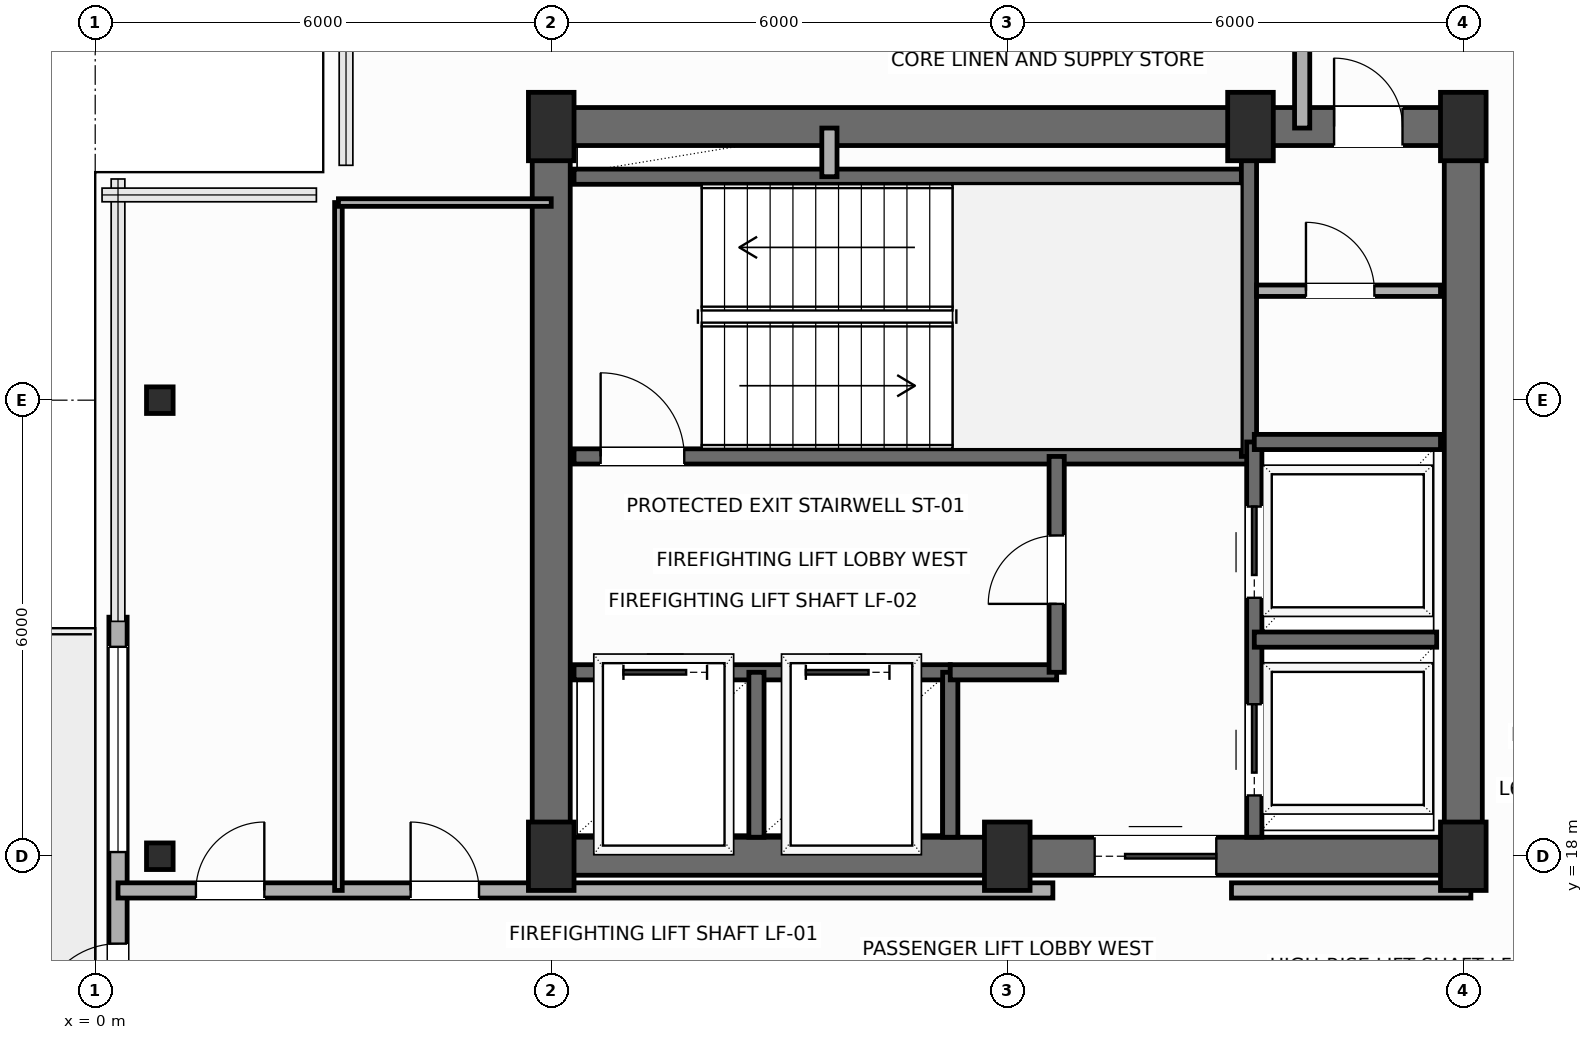
"""IFC4 building model, lengths in metres.
Left out: names, types, materials, properties, quantities, classifications, styles, units other than length and angle.
Written with IfcOpenShell. Run it as: python <this file> out.ifc"""

import sys

from ifc_helpers import new_model, si_unit, direction, frame, frame_2d, origin, origin_2d, place, context, subcontext, project, spatial, rectangle, hollow_rectangle, extrude, element, fill, save


model = new_model("IFC4")
c1 = context("Model", 3, precision=1e-05, world=origin(), true_north=direction((0.0, 1.0)))
c2 = subcontext(c1, "Body", "Model", "MODEL_VIEW")
j1 = project(units=[si_unit("LENGTHUNIT", "METRE"), si_unit("PLANEANGLEUNIT", "RADIAN")], contexts=[c1])
p1 = place(None, origin())
s1 = spatial("IfcSite", under=j1, at=p1, CompositionType="ELEMENT")
p2 = place(p1, origin())
s2 = spatial("IfcBuilding", under=s1, at=p2, CompositionType="ELEMENT")
p3 = place(p2, frame((0.0, 0.0, 250.2)))
s3 = spatial("IfcBuildingStorey", under=s2, at=p3, CompositionType="ELEMENT", Elevation=250.2)
for number, where, z_axis, x_axis in (
    (1, (6.0, 18.0, 0.0), (0.0, 0.0, 1.0), (1.0, 0.0, 0.0)),
    (2, (12.0, 18.0, 0.0), (0.0, 0.0, 1.0), (1.0, 0.0, 0.0)),
    (3, (18.0, 18.0, 0.0), (0.0, 0.0, 1.0), (1.0, 0.0, 0.0)),
    (4, (6.0, 27.6, 0.0), (0.0, 0.0, 1.0), (1.0, 0.0, 0.0)),
    (5, (15.2, 27.6, 0.0), (0.0, 0.0, 1.0), (1.0, 0.0, 0.0)),
    (6, (18.0, 27.6, 0.0), (0.0, 0.0, 1.0), (1.0, 0.0, 0.0)),
):
    element("IfcColumn", number, at=place(p3, frame(where, z_axis=z_axis, x_axis=x_axis)), inside=s3, PredefinedType="COLUMN", context=c2, shape_type="SweptSolid", body=[
        extrude(rectangle(XDim=0.6, YDim=0.9, at=origin_2d()), origin(), (0.0, 0.0, 1.0), 3.5),
    ])
for number, where, z_axis, x_axis in (
    (7, (0.85, 18.0, 0.0), (0.0, 0.0, 1.0), (1.0, 0.0, 0.0)),
    (8, (0.85, 24.0, 0.0), (0.0, 0.0, 1.0), (1.0, 0.0, 0.0)),
):
    element("IfcColumn", number, at=place(p3, frame(where, z_axis=z_axis, x_axis=x_axis)), inside=s3, PredefinedType="COLUMN", context=c2, shape_type="SweptSolid", body=[
        extrude(hollow_rectangle(XDim=0.35, YDim=0.35, WallThickness=0.016, InnerFilletRadius=0.016, OuterFilletRadius=0.032, at=origin_2d()), origin(), (0.0, 0.0, 1.0), 3.5),
    ])
p4 = place(p3, frame((0.3, 11.855, 0.0), z_axis=(0.0, 0.0, 1.0), x_axis=(0.0, 1.0, 0.0)))
e9 = element("IfcWall", 9, at=p4, inside=s3, PredefinedType="SOLIDWALL", context=c2, shape_type="SweptSolid", body=[
    extrude(rectangle(XDim=9.29, YDim=0.24, at=frame_2d((4.645, 0.0))), origin(), (0.0, 0.0, 1.0), 3.3),
])
p5 = place(p4, frame((3.945, 0.0, 0.0)))
e10 = element("IfcOpeningElement", 10, at=p5, cuts=e9, PredefinedType="OPENING", context=c2, shape_type="SweptSolid", body=[
    extrude(rectangle(XDim=1.05, YDim=2.2, at=frame_2d((0.525, 1.1))), frame((0.0, 0.13, 0.0), z_axis=(0.0, -1.0, 0.0), x_axis=(1.0, 0.0, 0.0)), (0.0, 0.0, 1.0), 0.26),
])
p6 = place(p4, frame((6.2, 0.0, 0.6)))
e11 = element("IfcOpeningElement", 11, at=p6, cuts=e9, PredefinedType="OPENING", context=c2, shape_type="SweptSolid", body=[
    extrude(rectangle(XDim=2.7, YDim=2.3, at=frame_2d((1.35, 1.15))), frame((0.0, 0.13, 0.0), z_axis=(0.0, -1.0, 0.0), x_axis=(1.0, 0.0, 0.0)), (0.0, 0.0, 1.0), 0.26),
])
p7 = place(p4, frame((0.7, 0.0, 0.6)))
e12 = element("IfcOpeningElement", 12, at=p7, cuts=e9, PredefinedType="OPENING", context=c2, shape_type="SweptSolid", body=[
    extrude(rectangle(XDim=0.9, YDim=2.2, at=frame_2d((0.45, 1.1))), frame((0.0, 0.13, 0.0), z_axis=(0.0, -1.0, 0.0), x_axis=(1.0, 0.0, 0.0)), (0.0, 0.0, 1.0), 0.26),
])
p8 = place(p3, frame((6.0, 18.0, 0.0), z_axis=(0.0, 0.0, 1.0), x_axis=(1.0, 0.0, 0.0)))
e13 = element("IfcWall", 13, at=p8, inside=s3, PredefinedType="SHEAR", context=c2, shape_type="SweptSolid", body=[
    extrude(rectangle(XDim=12.0, YDim=0.5, at=frame_2d((6.0, 0.0))), origin(), (0.0, 0.0, 1.0), 3.3),
])
p9 = place(p8, frame((7.15, 0.0, 0.0)))
e14 = element("IfcOpeningElement", 14, at=p9, cuts=e13, PredefinedType="OPENING", context=c2, shape_type="SweptSolid", body=[
    extrude(rectangle(XDim=1.6, YDim=2.3, at=frame_2d((0.8, 1.15))), frame((0.0, 0.26, 0.0), z_axis=(0.0, -1.0, 0.0), x_axis=(1.0, 0.0, 0.0)), (0.0, 0.0, 1.0), 0.52),
])
p10 = place(p3, frame((6.0, 27.6, 0.0), z_axis=(0.0, 0.0, 1.0), x_axis=(1.0, 0.0, 0.0)))
e15 = element("IfcWall", 15, at=p10, inside=s3, PredefinedType="SHEAR", context=c2, shape_type="SweptSolid", body=[
    extrude(rectangle(XDim=12.0, YDim=0.5, at=frame_2d((6.0, 0.0))), origin(), (0.0, 0.0, 1.0), 3.3),
])
p11 = place(p10, frame((10.3, 0.0, 0.0)))
e16 = element("IfcOpeningElement", 16, at=p11, cuts=e15, PredefinedType="OPENING", context=c2, shape_type="SweptSolid", body=[
    extrude(rectangle(XDim=0.9, YDim=2.15, at=frame_2d((0.45, 1.075))), frame((0.0, 0.26, 0.0), z_axis=(0.0, -1.0, 0.0), x_axis=(1.0, 0.0, 0.0)), (0.0, 0.0, 1.0), 0.52),
])
for number, where, z_axis, x_axis in (
    (17, (6.0, 18.0, 0.0), (0.0, 0.0, 1.0), (0.0, 1.0, 0.0)),
    (18, (18.0, 18.0, 0.0), (0.0, 0.0, 1.0), (0.0, 1.0, 0.0)),
):
    element("IfcWall", number, at=place(p3, frame(where, z_axis=z_axis, x_axis=x_axis)), inside=s3, PredefinedType="SHEAR", context=c2, shape_type="SweptSolid", body=[
        extrude(rectangle(XDim=9.6, YDim=0.5, at=frame_2d((4.8, 0.0))), origin(), (0.0, 0.0, 1.0), 3.3),
    ])
p12 = place(p3, frame((6.3, 23.26, 0.0), z_axis=(0.0, 0.0, 1.0), x_axis=(1.0, 0.0, 0.0)))
e19 = element("IfcWall", 19, at=p12, inside=s3, PredefinedType="SHEAR", context=c2, shape_type="SweptSolid", body=[
    extrude(rectangle(XDim=8.88, YDim=0.2, at=frame_2d((4.44, 0.0))), origin(), (0.0, 0.0, 1.0), 3.3),
])
p13 = place(p12, frame((0.35, 0.0, 0.0)))
e20 = element("IfcOpeningElement", 20, at=p13, cuts=e19, PredefinedType="OPENING", context=c2, shape_type="SweptSolid", body=[
    extrude(rectangle(XDim=1.1, YDim=2.2, at=frame_2d((0.55, 1.1))), frame((0.0, 0.11, 0.0), z_axis=(0.0, -1.0, 0.0), x_axis=(1.0, 0.0, 0.0)), (0.0, 0.0, 1.0), 0.22),
])
p14 = place(p3, frame((6.3, 26.94, 0.0), z_axis=(0.0, 0.0, 1.0), x_axis=(1.0, 0.0, 0.0)))
e21 = element("IfcWall", 21, at=p14, inside=s3, PredefinedType="SHEAR", context=c2, shape_type="SweptSolid", body=[
    extrude(rectangle(XDim=8.88, YDim=0.2, at=frame_2d((4.44, 0.0))), origin(), (0.0, 0.0, 1.0), 3.3),
])
p15 = place(p3, frame((15.18, 23.26, 0.0), z_axis=(0.0, 0.0, 1.0), x_axis=(0.0, 1.0, 0.0)))
e22 = element("IfcWall", 22, at=p15, inside=s3, PredefinedType="SHEAR", context=c2, shape_type="SweptSolid", body=[
    extrude(rectangle(XDim=4.04, YDim=0.2, at=frame_2d((2.02, 0.0))), origin(), (0.0, 0.0, 1.0), 3.3),
])
p16 = place(p3, frame((6.3, 20.42, 0.0), z_axis=(0.0, 0.0, 1.0), x_axis=(1.0, 0.0, 0.0)))
e23 = element("IfcWall", 23, at=p16, inside=s3, PredefinedType="SHEAR", context=c2, shape_type="SweptSolid", body=[
    extrude(rectangle(XDim=4.95, YDim=0.2, at=frame_2d((2.475, 0.0))), origin(), (0.0, 0.0, 1.0), 3.3),
])
p17 = place(p16, frame((0.65, 0.0, 0.0)))
e24 = element("IfcOpeningElement", 24, at=p17, cuts=e23, PredefinedType="OPENING", context=c2, shape_type="SweptSolid", body=[
    extrude(rectangle(XDim=1.1, YDim=2.2, at=frame_2d((0.55, 1.1))), frame((0.0, 0.11, 0.0), z_axis=(0.0, -1.0, 0.0), x_axis=(1.0, 0.0, 0.0)), (0.0, 0.0, 1.0), 0.22),
])
p18 = place(p16, frame((3.05, 0.0, 0.0)))
e25 = element("IfcOpeningElement", 25, at=p18, cuts=e23, PredefinedType="OPENING", context=c2, shape_type="SweptSolid", body=[
    extrude(rectangle(XDim=1.1, YDim=2.2, at=frame_2d((0.55, 1.1))), frame((0.0, 0.11, 0.0), z_axis=(0.0, -1.0, 0.0), x_axis=(1.0, 0.0, 0.0)), (0.0, 0.0, 1.0), 0.22),
])
for number, where, z_axis, x_axis in (
    (26, (8.7, 18.25, 0.0), (0.0, 0.0, 1.0), (0.0, 1.0, 0.0)),
    (27, (11.25, 18.25, 0.0), (0.0, 0.0, 1.0), (0.0, 1.0, 0.0)),
):
    element("IfcWall", number, at=place(p3, frame(where, z_axis=z_axis, x_axis=x_axis)), inside=s3, PredefinedType="SHEAR", context=c2, shape_type="SweptSolid", body=[
        extrude(rectangle(XDim=2.17, YDim=0.2, at=frame_2d((1.085, 0.0))), origin(), (0.0, 0.0, 1.0), 3.3),
    ])
p19 = place(p3, frame((11.25, 20.42, 0.0), z_axis=(0.0, 0.0, 1.0), x_axis=(1.0, 0.0, 0.0)))
e28 = element("IfcWall", 28, at=p19, inside=s3, PredefinedType="SHEAR", context=c2, shape_type="SweptSolid", body=[
    extrude(rectangle(XDim=1.4, YDim=0.2, at=frame_2d((0.7, 0.0))), origin(), (0.0, 0.0, 1.0), 3.3),
])
p20 = place(p3, frame((12.65, 20.42, 0.0), z_axis=(0.0, 0.0, 1.0), x_axis=(0.0, 1.0, 0.0)))
e29 = element("IfcWall", 29, at=p20, inside=s3, PredefinedType="SHEAR", context=c2, shape_type="SweptSolid", body=[
    extrude(rectangle(XDim=2.84, YDim=0.2, at=frame_2d((1.42, 0.0))), origin(), (0.0, 0.0, 1.0), 3.3),
])
p21 = place(p20, frame((0.9, 0.0, 0.0)))
e30 = element("IfcOpeningElement", 30, at=p21, cuts=e29, PredefinedType="OPENING", context=c2, shape_type="SweptSolid", body=[
    extrude(rectangle(XDim=0.9, YDim=2.15, at=frame_2d((0.45, 1.075))), frame((0.0, 0.11, 0.0), z_axis=(0.0, -1.0, 0.0), x_axis=(1.0, 0.0, 0.0)), (0.0, 0.0, 1.0), 0.22),
])
p22 = place(p3, frame((9.66, 26.94, 0.0), z_axis=(0.0, 0.0, 1.0), x_axis=(0.0, 1.0, 0.0)))
e31 = element("IfcWall", 31, at=p22, inside=s3, PredefinedType="SOLIDWALL", context=c2, shape_type="SweptSolid", body=[
    extrude(rectangle(XDim=0.64, YDim=0.2, at=frame_2d((0.32, 0.0))), origin(), (0.0, 0.0, 1.0), 3.3),
])
p23 = place(p3, frame((15.25, 18.25, 0.0), z_axis=(0.0, 0.0, 1.0), x_axis=(0.0, 1.0, 0.0)))
e32 = element("IfcWall", 32, at=p23, inside=s3, PredefinedType="SHEAR", context=c2, shape_type="SweptSolid", body=[
    extrude(rectangle(XDim=5.2, YDim=0.2, at=frame_2d((2.6, 0.0))), origin(), (0.0, 0.0, 1.0), 3.3),
])
p24 = place(p23, frame((0.55, 0.0, 0.0)))
e33 = element("IfcOpeningElement", 33, at=p24, cuts=e32, PredefinedType="OPENING", context=c2, shape_type="SweptSolid", body=[
    extrude(rectangle(XDim=1.2, YDim=2.2, at=frame_2d((0.6, 1.1))), frame((0.0, 0.11, 0.0), z_axis=(0.0, -1.0, 0.0), x_axis=(1.0, 0.0, 0.0)), (0.0, 0.0, 1.0), 0.22),
])
p25 = place(p23, frame((3.15, 0.0, 0.0)))
e34 = element("IfcOpeningElement", 34, at=p25, cuts=e32, PredefinedType="OPENING", context=c2, shape_type="SweptSolid", body=[
    extrude(rectangle(XDim=1.2, YDim=2.2, at=frame_2d((0.6, 1.1))), frame((0.0, 0.11, 0.0), z_axis=(0.0, -1.0, 0.0), x_axis=(1.0, 0.0, 0.0)), (0.0, 0.0, 1.0), 0.22),
])
p26 = place(p3, frame((15.25, 20.85, 0.0), z_axis=(0.0, 0.0, 1.0), x_axis=(1.0, 0.0, 0.0)))
e35 = element("IfcWall", 35, at=p26, inside=s3, PredefinedType="SHEAR", context=c2, shape_type="SweptSolid", body=[
    extrude(rectangle(XDim=2.4, YDim=0.2, at=frame_2d((1.2, 0.0))), origin(), (0.0, 0.0, 1.0), 3.3),
])
p27 = place(p3, frame((15.25, 23.45, 0.0), z_axis=(0.0, 0.0, 1.0), x_axis=(1.0, 0.0, 0.0)))
e36 = element("IfcWall", 36, at=p27, inside=s3, PredefinedType="SHEAR", context=c2, shape_type="SweptSolid", body=[
    extrude(rectangle(XDim=2.45, YDim=0.2, at=frame_2d((1.225, 0.0))), origin(), (0.0, 0.0, 1.0), 3.3),
])
p28 = place(p3, frame((15.28, 25.44, 0.0), z_axis=(0.0, 0.0, 1.0), x_axis=(1.0, 0.0, 0.0)))
e37 = element("IfcWall", 37, at=p28, inside=s3, PredefinedType="PARTITIONING", context=c2, shape_type="SweptSolid", body=[
    extrude(rectangle(XDim=2.42, YDim=0.15, at=frame_2d((1.21, 0.0))), origin(), (0.0, 0.0, 1.0), 3.3),
])
p29 = place(p28, frame((0.65, 0.0, 0.0)))
e38 = element("IfcOpeningElement", 38, at=p29, cuts=e37, PredefinedType="OPENING", context=c2, shape_type="SweptSolid", body=[
    extrude(rectangle(XDim=0.9, YDim=2.15, at=frame_2d((0.45, 1.075))), frame((0.0, 0.085, 0.0), z_axis=(0.0, -1.0, 0.0), x_axis=(1.0, 0.0, 0.0)), (0.0, 0.0, 1.0), 0.17),
])
p30 = place(p3, frame((0.3, 17.55, 0.0), z_axis=(0.0, 0.0, 1.0), x_axis=(1.0, 0.0, 0.0)))
e39 = element("IfcWall", 39, at=p30, inside=s3, PredefinedType="SOLIDWALL", context=c2, shape_type="SweptSolid", body=[
    extrude(rectangle(XDim=12.3, YDim=0.2, at=frame_2d((6.15, 0.0))), origin(), (0.0, 0.0, 1.0), 3.3),
])
p31 = place(p30, frame((1.025, 0.0, 0.0)))
e40 = element("IfcOpeningElement", 40, at=p31, cuts=e39, PredefinedType="OPENING", context=c2, shape_type="SweptSolid", body=[
    extrude(rectangle(XDim=0.9, YDim=2.1, at=frame_2d((0.45, 1.05))), frame((0.0, 0.11, 0.0), z_axis=(0.0, -1.0, 0.0), x_axis=(1.0, 0.0, 0.0)), (0.0, 0.0, 1.0), 0.22),
])
p32 = place(p30, frame((3.85, 0.0, 0.0)))
e41 = element("IfcOpeningElement", 41, at=p32, cuts=e39, PredefinedType="OPENING", context=c2, shape_type="SweptSolid", body=[
    extrude(rectangle(XDim=0.9, YDim=2.1, at=frame_2d((0.45, 1.05))), frame((0.0, 0.11, 0.0), z_axis=(0.0, -1.0, 0.0), x_axis=(1.0, 0.0, 0.0)), (0.0, 0.0, 1.0), 0.22),
])
p33 = place(p3, frame((14.95, 17.55, 0.0), z_axis=(0.0, 0.0, 1.0), x_axis=(1.0, 0.0, 0.0)))
e42 = element("IfcWall", 42, at=p33, inside=s3, PredefinedType="SOLIDWALL", context=c2, shape_type="SweptSolid", body=[
    extrude(rectangle(XDim=3.15, YDim=0.2, at=frame_2d((1.575, 0.0))), origin(), (0.0, 0.0, 1.0), 3.3),
])
p34 = place(p3, frame((15.88, 27.58, 0.0), z_axis=(0.0, 0.0, 1.0), x_axis=(0.0, 1.0, 0.0)))
e43 = element("IfcWall", 43, at=p34, inside=s3, PredefinedType="SOLIDWALL", context=c2, shape_type="SweptSolid", body=[
    extrude(rectangle(XDim=2.12, YDim=0.2, at=frame_2d((1.06, 0.0))), origin(), (0.0, 0.0, 1.0), 3.3),
])
p35 = place(p3, frame((3.2, 17.55, 0.0), z_axis=(0.0, 0.0, 1.0), x_axis=(0.0, 1.0, 0.0)))
e44 = element("IfcWall", 44, at=p35, inside=s3, PredefinedType="PARTITIONING", context=c2, shape_type="SweptSolid", body=[
    extrude(rectangle(XDim=9.05, YDim=0.1, at=frame_2d((4.525, 0.0))), origin(), (0.0, 0.0, 1.0), 3.3),
])
p36 = place(p3, frame((3.2, 26.6, 0.0), z_axis=(0.0, 0.0, 1.0), x_axis=(1.0, 0.0, 0.0)))
e45 = element("IfcWall", 45, at=p36, inside=s3, PredefinedType="PARTITIONING", context=c2, shape_type="SweptSolid", body=[
    extrude(rectangle(XDim=2.8, YDim=0.1, at=frame_2d((1.4, 0.0))), origin(), (0.0, 0.0, 1.0), 3.3),
])
p37 = place(p5, origin())
e46 = element("IfcDoor", 46, at=p37, inside=s3, OperationType="SINGLE_SWING_LEFT", PredefinedType="DOOR", context=c2, shape_type="SweptSolid", body=[
    extrude(rectangle(XDim=1.05, YDim=2.2, at=frame_2d((0.525, 1.1))), frame((0.0, 0.025, 0.0), z_axis=(0.0, -1.0, 0.0), x_axis=(1.0, 0.0, 0.0)), (0.0, 0.0, 1.0), 0.05),
])
fill(e10, e46)
p38 = place(p6, origin())
e47 = element("IfcWindow", 47, at=p38, inside=s3, PartitioningType="SINGLE_PANEL", PredefinedType="WINDOW", context=c2, shape_type="SweptSolid", body=[
    extrude(rectangle(XDim=2.7, YDim=2.3, at=frame_2d((1.35, 1.15))), frame((0.0, 0.03, 0.0), z_axis=(0.0, -1.0, 0.0), x_axis=(1.0, 0.0, 0.0)), (0.0, 0.0, 1.0), 0.06),
])
fill(e11, e47)
p39 = place(p9, origin())
e48 = element("IfcDoor", 48, at=p39, inside=s3, OperationType="DOUBLE_DOOR_SLIDING", PredefinedType="DOOR", context=c2, shape_type="SweptSolid", body=[
    extrude(rectangle(XDim=1.6, YDim=2.3, at=frame_2d((0.8, 1.15))), frame((0.0, 0.025, 0.0), z_axis=(0.0, -1.0, 0.0), x_axis=(1.0, 0.0, 0.0)), (0.0, 0.0, 1.0), 0.05),
])
fill(e14, e48)
p40 = place(p11, origin())
e49 = element("IfcDoor", 49, at=p40, inside=s3, OperationType="SINGLE_SWING_LEFT", PredefinedType="DOOR", context=c2, shape_type="SweptSolid", body=[
    extrude(rectangle(XDim=0.9, YDim=2.15, at=frame_2d((0.45, 1.075))), frame((0.0, 0.025, 0.0), z_axis=(0.0, -1.0, 0.0), x_axis=(1.0, 0.0, 0.0)), (0.0, 0.0, 1.0), 0.05),
])
fill(e16, e49)
p41 = place(p13, origin())
e50 = element("IfcDoor", 50, at=p41, inside=s3, OperationType="SINGLE_SWING_LEFT", PredefinedType="DOOR", context=c2, shape_type="SweptSolid", body=[
    extrude(rectangle(XDim=1.1, YDim=2.2, at=frame_2d((0.55, 1.1))), frame((0.0, 0.025, 0.0), z_axis=(0.0, -1.0, 0.0), x_axis=(1.0, 0.0, 0.0)), (0.0, 0.0, 1.0), 0.05),
])
fill(e20, e50)
p42 = place(p17, origin())
e51 = element("IfcDoor", 51, at=p42, inside=s3, OperationType="SLIDING_TO_LEFT", PredefinedType="DOOR", context=c2, shape_type="SweptSolid", body=[
    extrude(rectangle(XDim=1.1, YDim=2.2, at=frame_2d((0.55, 1.1))), frame((0.0, 0.025, 0.0), z_axis=(0.0, -1.0, 0.0), x_axis=(1.0, 0.0, 0.0)), (0.0, 0.0, 1.0), 0.05),
])
fill(e24, e51)
p43 = place(p18, origin())
e52 = element("IfcDoor", 52, at=p43, inside=s3, OperationType="SLIDING_TO_LEFT", PredefinedType="DOOR", context=c2, shape_type="SweptSolid", body=[
    extrude(rectangle(XDim=1.1, YDim=2.2, at=frame_2d((0.55, 1.1))), frame((0.0, 0.025, 0.0), z_axis=(0.0, -1.0, 0.0), x_axis=(1.0, 0.0, 0.0)), (0.0, 0.0, 1.0), 0.05),
])
fill(e25, e52)
p44 = place(p21, origin())
e53 = element("IfcDoor", 53, at=p44, inside=s3, OperationType="SINGLE_SWING_LEFT", PredefinedType="DOOR", context=c2, shape_type="SweptSolid", body=[
    extrude(rectangle(XDim=0.9, YDim=2.15, at=frame_2d((0.45, 1.075))), frame((0.0, 0.025, 0.0), z_axis=(0.0, -1.0, 0.0), x_axis=(1.0, 0.0, 0.0)), (0.0, 0.0, 1.0), 0.05),
])
fill(e30, e53)
p45 = place(p24, origin())
e54 = element("IfcDoor", 54, at=p45, inside=s3, OperationType="SLIDING_TO_RIGHT", PredefinedType="DOOR", context=c2, shape_type="SweptSolid", body=[
    extrude(rectangle(XDim=1.2, YDim=2.2, at=frame_2d((0.6, 1.1))), frame((0.0, 0.025, 0.0), z_axis=(0.0, -1.0, 0.0), x_axis=(1.0, 0.0, 0.0)), (0.0, 0.0, 1.0), 0.05),
])
fill(e33, e54)
p46 = place(p25, origin())
e55 = element("IfcDoor", 55, at=p46, inside=s3, OperationType="SLIDING_TO_RIGHT", PredefinedType="DOOR", context=c2, shape_type="SweptSolid", body=[
    extrude(rectangle(XDim=1.2, YDim=2.2, at=frame_2d((0.6, 1.1))), frame((0.0, 0.025, 0.0), z_axis=(0.0, -1.0, 0.0), x_axis=(1.0, 0.0, 0.0)), (0.0, 0.0, 1.0), 0.05),
])
fill(e34, e55)
p47 = place(p29, origin())
e56 = element("IfcDoor", 56, at=p47, inside=s3, OperationType="SINGLE_SWING_LEFT", PredefinedType="DOOR", context=c2, shape_type="SweptSolid", body=[
    extrude(rectangle(XDim=0.9, YDim=2.15, at=frame_2d((0.45, 1.075))), frame((0.0, 0.025, 0.0), z_axis=(0.0, -1.0, 0.0), x_axis=(1.0, 0.0, 0.0)), (0.0, 0.0, 1.0), 0.05),
])
fill(e38, e56)
p48 = place(p31, origin())
e57 = element("IfcDoor", 57, at=p48, inside=s3, OperationType="SINGLE_SWING_RIGHT", PredefinedType="DOOR", context=c2, shape_type="SweptSolid", body=[
    extrude(rectangle(XDim=0.9, YDim=2.1, at=frame_2d((0.45, 1.05))), frame((0.0, 0.025, 0.0), z_axis=(0.0, -1.0, 0.0), x_axis=(1.0, 0.0, 0.0)), (0.0, 0.0, 1.0), 0.05),
])
fill(e40, e57)
p49 = place(p32, origin())
e58 = element("IfcDoor", 58, at=p49, inside=s3, OperationType="SINGLE_SWING_LEFT", PredefinedType="DOOR", context=c2, shape_type="SweptSolid", body=[
    extrude(rectangle(XDim=0.9, YDim=2.1, at=frame_2d((0.45, 1.05))), frame((0.0, 0.025, 0.0), z_axis=(0.0, -1.0, 0.0), x_axis=(1.0, 0.0, 0.0)), (0.0, 0.0, 1.0), 0.05),
])
fill(e41, e58)
save(model, sys.argv[1])
